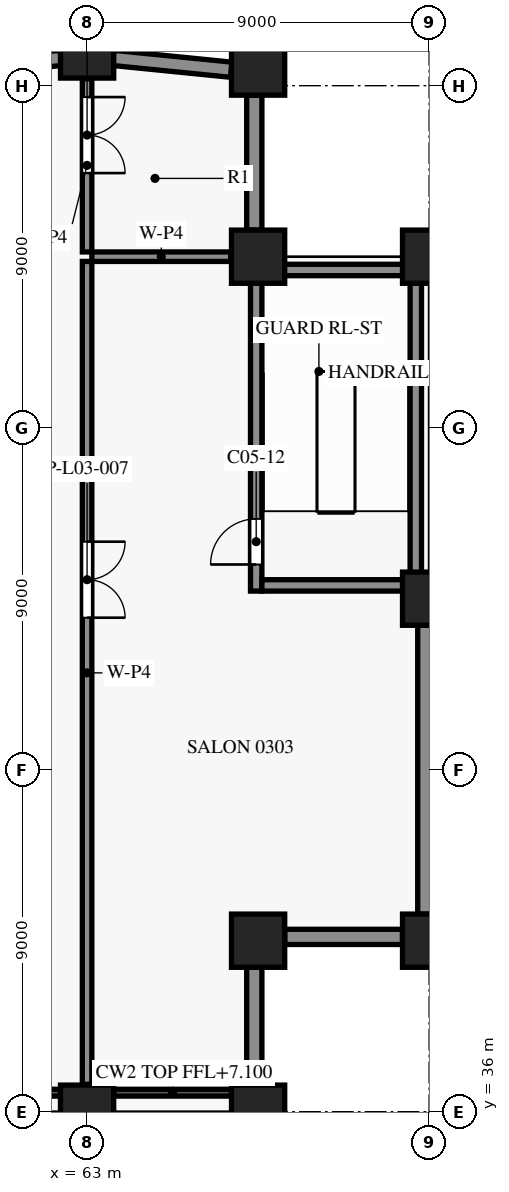
"""IFC4 building model, lengths in metres.
Left out: names, types, materials, properties, quantities, classifications, styles, units other than length and angle.
Written with IfcOpenShell. Run it as: python <this file> out.ifc"""

import sys

from ifc_helpers import new_model, si_unit, direction, frame, frame_2d, origin, origin_2d, place, context, subcontext, project, spatial, rectangle, extrude, element, fill, save


model = new_model("IFC4")
c1 = context("Model", 3, precision=1e-05, world=origin(), true_north=direction((0.0, 1.0)))
c2 = subcontext(c1, "Body", "Model", "MODEL_VIEW")
j1 = project(units=[si_unit("LENGTHUNIT", "METRE"), si_unit("PLANEANGLEUNIT", "RADIAN")], contexts=[c1])
p1 = place(None, origin())
s1 = spatial("IfcSite", under=j1, at=p1, CompositionType="ELEMENT")
p2 = place(p1, origin())
s2 = spatial("IfcBuilding", under=s1, at=p2, CompositionType="ELEMENT")
p3 = place(p2, frame((0.0, 0.0, 19.5)))
s3 = spatial("IfcBuildingStorey", under=s2, at=p3, CompositionType="ELEMENT", Elevation=19.5)
for number, where, z_axis, x_axis in (
    (1, (63.0, 36.0, 0.0), (0.0, 0.0, 1.0), (1.0, 0.0, 0.0)),
    (2, (67.5, 36.0, 0.0), (0.0, 0.0, 1.0), (1.0, 0.0, 0.0)),
    (3, (72.0, 40.5, 0.0), (0.0, 0.0, 1.0), (1.0, 0.0, 0.0)),
    (4, (72.0, 49.5, 0.0), (0.0, 0.0, 1.0), (1.0, 0.0, 0.0)),
    (5, (72.0, 58.5, 0.0), (0.0, 0.0, 1.0), (1.0, 0.0, 0.0)),
    (6, (67.5, 63.45, 0.0), (0.0, 0.0, 1.0), (1.0, 0.0, 0.0)),
    (7, (63.0, 63.9, 0.0), (0.0, 0.0, 1.0), (1.0, 0.0, 0.0)),
    (8, (67.5, 40.5, 0.0), (0.0, 0.0, 1.0), (1.0, 0.0, 0.0)),
    (9, (67.5, 58.5, 0.0), (0.0, 0.0, 1.0), (1.0, 0.0, 0.0)),
):
    element("IfcColumn", number, at=place(p3, frame(where, z_axis=z_axis, x_axis=x_axis)), inside=s3, PredefinedType="COLUMN", context=c2, shape_type="SweptSolid", body=[
        extrude(rectangle(XDim=1.4, YDim=1.4, at=origin_2d()), origin(), (0.0, 0.0, 1.0), 8.0),
    ])
for number, where, z_axis, x_axis in (
    (10, (67.4, 39.8, 0.0), (0.0, 0.0, 1.0), (0.0, -1.0, 0.0)),
    (11, (71.3, 40.6, 0.0), (0.0, 0.0, 1.0), (-1.0, 0.0, 0.0)),
):
    element("IfcWall", number, at=place(p3, frame(where, z_axis=z_axis, x_axis=x_axis)), inside=s3, PredefinedType="SOLIDWALL", context=c2, shape_type="SweptSolid", body=[
        extrude(rectangle(XDim=3.1, YDim=0.4, at=frame_2d((1.55, 0.0))), origin(), (0.0, 0.0, 1.0), 7.1),
    ])
p4 = place(p3, frame((71.9, 48.8, 0.0), z_axis=(0.0, 0.0, 1.0), x_axis=(0.0, -1.0, 0.0)))
e12 = element("IfcWall", 12, at=p4, inside=s3, PredefinedType="SOLIDWALL", context=c2, shape_type="SweptSolid", body=[
    extrude(rectangle(XDim=7.6, YDim=0.4, at=frame_2d((3.8, 0.0))), origin(), (0.0, 0.0, 1.0), 7.1),
])
p5 = place(p3, frame((67.4, 62.75, 0.0), z_axis=(0.0, 0.0, 1.0), x_axis=(0.0, -1.0, 0.0)))
e13 = element("IfcWall", 13, at=p5, inside=s3, PredefinedType="SOLIDWALL", context=c2, shape_type="SweptSolid", body=[
    extrude(rectangle(XDim=3.55, YDim=0.4, at=frame_2d((1.775, 0.0))), origin(), (0.0, 0.0, 1.0), 7.1),
])
p6 = place(p3, frame((63.687, 63.731, 0.0), z_axis=(0.0, 0.0, 1.0), x_axis=(0.995041834057, -0.099457269599, 0.0)))
e14 = element("IfcWall", 14, at=p6, inside=s3, PredefinedType="SOLIDWALL", context=c2, shape_type="SweptSolid", body=[
    extrude(rectangle(XDim=3.122, YDim=0.4, at=frame_2d((1.561, 0.0))), origin(), (0.0, 0.0, 1.0), 7.1),
])
p7 = place(p3, frame((54.707, 62.97, 0.0), z_axis=(0.0, 0.0, 1.0), x_axis=(0.995039719416, 0.099478423711, 0.0)))
e15 = element("IfcWall", 15, at=p7, inside=s3, PredefinedType="SOLIDWALL", context=c2, shape_type="SweptSolid", body=[
    extrude(rectangle(XDim=7.645, YDim=0.4, at=frame_2d((3.822, 0.0))), origin(), (0.0, 0.0, 1.0), 7.1),
])
for number, where, z_axis, x_axis in (
    (16, (67.6, 49.85, 0.0), (0.0, 0.0, 1.0), (1.0, 0.0, 0.0)),
    (17, (67.6, 58.15, 0.0), (0.0, 0.0, 1.0), (1.0, 0.0, 0.0)),
):
    element("IfcWall", number, at=place(p3, frame(where, z_axis=z_axis, x_axis=x_axis)), inside=s3, PredefinedType="SHEAR", context=c2, shape_type="SweptSolid", body=[
        extrude(rectangle(XDim=3.9, YDim=0.3, at=frame_2d((1.95, 0.0))), origin(), (0.0, 0.0, 1.0), 7.7),
    ])
p8 = place(p3, frame((67.45, 49.7, 0.0), z_axis=(0.0, 0.0, 1.0), x_axis=(0.0, 1.0, 0.0)))
e18 = element("IfcWall", 18, at=p8, inside=s3, PredefinedType="SHEAR", context=c2, shape_type="SweptSolid", body=[
    extrude(rectangle(XDim=8.6, YDim=0.3, at=frame_2d((4.3, 0.0))), origin(), (0.0, 0.0, 1.0), 7.7),
])
p9 = place(p8, frame((0.7, 0.0, 0.0)))
e19 = element("IfcOpeningElement", 19, at=p9, cuts=e18, PredefinedType="OPENING", context=c2, shape_type="SweptSolid", body=[
    extrude(rectangle(XDim=1.2, YDim=2.2, at=frame_2d((0.6, 1.1))), frame((0.0, 0.16, 0.0), z_axis=(0.0, -1.0, 0.0), x_axis=(1.0, 0.0, 0.0)), (0.0, 0.0, 1.0), 0.32),
])
p10 = place(p3, frame((71.65, 49.7, 0.0), z_axis=(0.0, 0.0, 1.0), x_axis=(0.0, 1.0, 0.0)))
e20 = element("IfcWall", 20, at=p10, inside=s3, PredefinedType="SHEAR", context=c2, shape_type="SweptSolid", body=[
    extrude(rectangle(XDim=8.6, YDim=0.3, at=frame_2d((4.3, 0.0))), origin(), (0.0, 0.0, 1.0), 7.7),
])
p11 = place(p3, frame((63.0, 58.375, 0.0), z_axis=(0.0, 0.0, 1.0), x_axis=(0.0, -1.0, 0.0)))
e21 = element("IfcWall", 21, at=p11, inside=s3, PredefinedType="PARTITIONING", context=c2, shape_type="SweptSolid", body=[
    extrude(rectangle(XDim=21.655, YDim=0.25, at=frame_2d((10.828, 0.0))), origin(), (0.0, 0.0, 1.0), 6.98),
])
p12 = place(p11, frame((7.375, 0.0, 0.0)))
e22 = element("IfcOpeningElement", 22, at=p12, cuts=e21, PredefinedType="OPENING", context=c2, shape_type="SweptSolid", body=[
    extrude(rectangle(XDim=2.0, YDim=2.1, at=frame_2d((1.0, 1.05))), frame((0.0, 0.135, 0.0), z_axis=(0.0, -1.0, 0.0), x_axis=(1.0, 0.0, 0.0)), (0.0, 0.0, 1.0), 0.27),
])
p13 = place(p3, frame((63.125, 58.5, 0.0), z_axis=(0.0, 0.0, 1.0), x_axis=(1.0, 0.0, 0.0)))
e23 = element("IfcWall", 23, at=p13, inside=s3, PredefinedType="PARTITIONING", context=c2, shape_type="SweptSolid", body=[
    extrude(rectangle(XDim=3.655, YDim=0.25, at=frame_2d((1.828, 0.0))), origin(), (0.0, 0.0, 1.0), 6.98),
])
p14 = place(p3, frame((63.0, 63.18, 0.0), z_axis=(0.0, 0.0, 1.0), x_axis=(0.0, -1.0, 0.0)))
e24 = element("IfcWall", 24, at=p14, inside=s3, PredefinedType="PARTITIONING", context=c2, shape_type="SweptSolid", body=[
    extrude(rectangle(XDim=4.555, YDim=0.25, at=frame_2d((2.277, 0.0))), origin(), (0.0, 0.0, 1.0), 6.98),
])
p15 = place(p14, frame((0.48, 0.0, 0.0)))
e25 = element("IfcOpeningElement", 25, at=p15, cuts=e24, PredefinedType="OPENING", context=c2, shape_type="SweptSolid", body=[
    extrude(rectangle(XDim=2.0, YDim=2.1, at=frame_2d((1.0, 1.05))), frame((0.0, 0.135, 0.0), z_axis=(0.0, -1.0, 0.0), x_axis=(1.0, 0.0, 0.0)), (0.0, 0.0, 1.0), 0.27),
])
p16 = place(p9, origin())
e26 = element("IfcDoor", 26, at=p16, inside=s3, OperationType="SINGLE_SWING_RIGHT", PredefinedType="DOOR", context=c2, shape_type="SweptSolid", body=[
    extrude(rectangle(XDim=1.2, YDim=2.2, at=frame_2d((0.6, 1.1))), frame((0.0, 0.025, 0.0), z_axis=(0.0, -1.0, 0.0), x_axis=(1.0, 0.0, 0.0)), (0.0, 0.0, 1.0), 0.05),
])
fill(e19, e26)
p17 = place(p12, origin())
e27 = element("IfcDoor", 27, at=p17, inside=s3, OperationType="DOUBLE_DOOR_SINGLE_SWING", PredefinedType="DOOR", context=c2, shape_type="SweptSolid", body=[
    extrude(rectangle(XDim=2.0, YDim=2.1, at=frame_2d((1.0, 1.05))), frame((0.0, 0.025, 0.0), z_axis=(0.0, -1.0, 0.0), x_axis=(1.0, 0.0, 0.0)), (0.0, 0.0, 1.0), 0.05),
])
fill(e22, e27)
p18 = place(p15, origin())
e28 = element("IfcDoor", 28, at=p18, inside=s3, OperationType="DOUBLE_DOOR_SINGLE_SWING", PredefinedType="DOOR", context=c2, shape_type="SweptSolid", body=[
    extrude(rectangle(XDim=2.0, YDim=2.1, at=frame_2d((1.0, 1.05))), frame((0.0, 0.025, 0.0), z_axis=(0.0, -1.0, 0.0), x_axis=(1.0, 0.0, 0.0)), (0.0, 0.0, 1.0), 0.05),
])
fill(e25, e28)
save(model, sys.argv[1])
